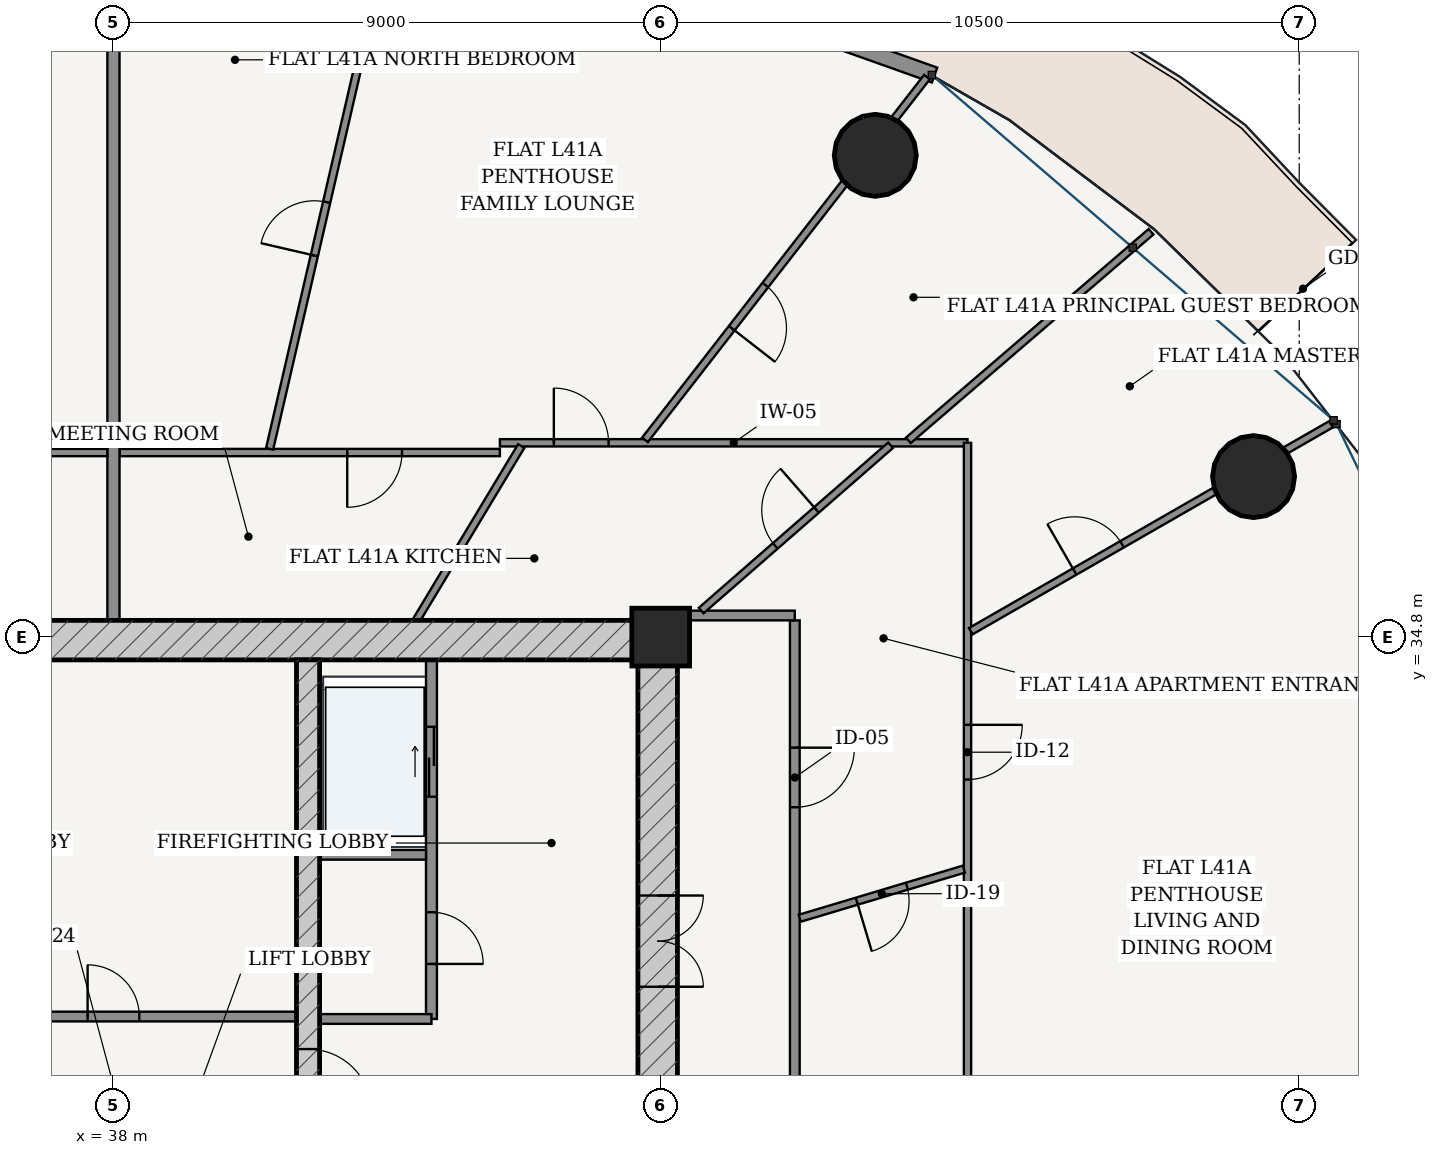
"""IFC4 building model, lengths in metres.
Left out: names, types, materials, properties, quantities, classifications, styles, units other than length and angle.
Written with IfcOpenShell. Run it as: python <this file> out.ifc"""

import sys

from ifc_helpers import new_model, si_unit, direction, frame, frame_2d, origin, origin_2d, place, context, subcontext, project, spatial, rectangle, hollow_circle, extrude, source, transform, mapped, element, fill, save


model = new_model("IFC4")
c1 = context("Model", 3, precision=1e-05, world=origin(), true_north=direction((-0.2419218956, 0.970295726276)))
c2 = subcontext(c1, "Body", "Model", "MODEL_VIEW")
j1 = project(units=[si_unit("LENGTHUNIT", "METRE"), si_unit("PLANEANGLEUNIT", "RADIAN")], contexts=[c1])
p1 = place(None, origin())
s1 = spatial("IfcSite", under=j1, at=p1, CompositionType="ELEMENT")
p2 = place(p1, origin())
s2 = spatial("IfcBuilding", under=s1, at=p2, CompositionType="ELEMENT")
p3 = place(p2, frame((0.0, 0.0, 157.0)))
s3 = spatial("IfcBuildingStorey", under=s2, at=p3, CompositionType="ELEMENT", Elevation=157.0)
p4 = place(p3, frame((47.0, 34.8, 0.0), z_axis=(0.0, 0.0, 1.0), x_axis=(1.0, 0.0, 0.0)))
e1 = element("IfcColumn", 1, at=p4, inside=s3, PredefinedType="COLUMN", context=c2, shape_type="SweptSolid", body=[
    extrude(rectangle(XDim=0.95, YDim=0.95, at=origin_2d()), origin(), (0.0, 0.0, 1.0), 3.6),
])
p5 = place(p3, frame((28.725, 34.75, 0.0), z_axis=(0.0, 0.0, 1.0), x_axis=(1.0, 0.0, 0.0)))
e2 = element("IfcWall", 2, at=p5, inside=s3, PredefinedType="SHEAR", context=c2, shape_type="SweptSolid", body=[
    extrude(rectangle(XDim=18.55, YDim=0.65, at=frame_2d((9.275, 0.0))), origin(), (0.0, 0.0, 1.0), 3.33),
])
p6 = place(p3, frame((46.95, 19.175, 0.0), z_axis=(0.0, 0.0, 1.0), x_axis=(0.0, 1.0, 0.0)))
e3 = element("IfcWall", 3, at=p6, inside=s3, PredefinedType="SHEAR", context=c2, shape_type="SweptSolid", body=[
    extrude(rectangle(XDim=15.25, YDim=0.65, at=frame_2d((7.625, 0.0))), origin(), (0.0, 0.0, 1.0), 3.33),
])
p7 = place(p6, frame((9.875, 0.0, 0.0)))
e4 = element("IfcOpeningElement", 4, at=p7, cuts=e3, PredefinedType="OPENING", context=c2, shape_type="SweptSolid", body=[
    extrude(rectangle(XDim=1.5, YDim=2.2, at=frame_2d((0.75, 1.1))), frame((0.0, 0.335, 0.0), z_axis=(0.0, -1.0, 0.0), x_axis=(1.0, 0.0, 0.0)), (0.0, 0.0, 1.0), 0.67),
])
p8 = place(p3, frame((41.2, 19.175, 0.0), z_axis=(0.0, 0.0, 1.0), x_axis=(0.0, 1.0, 0.0)))
e5 = element("IfcWall", 5, at=p8, inside=s3, PredefinedType="SHEAR", context=c2, shape_type="SweptSolid", body=[
    extrude(rectangle(XDim=15.25, YDim=0.38, at=frame_2d((7.625, 0.0))), origin(), (0.0, 0.0, 1.0), 3.33),
])
p9 = place(p8, frame((7.8, 0.0, 0.0)))
e6 = element("IfcOpeningElement", 6, at=p9, cuts=e5, PredefinedType="OPENING", context=c2, shape_type="SweptSolid", body=[
    extrude(rectangle(XDim=1.05, YDim=2.15, at=frame_2d((0.525, 1.075))), frame((0.0, 0.2, 0.0), z_axis=(0.0, -1.0, 0.0), x_axis=(1.0, 0.0, 0.0)), (0.0, 0.0, 1.0), 0.4),
])
for number, where, z_axis, x_axis in (
    (7, (56.75, 37.439, 0.0), (0.0, 0.0, 1.0), (1.0, 0.0, 0.0)),
    (8, (50.528, 42.723, 0.0), (0.0, 0.0, 1.0), (1.0, 0.0, 0.0)),
):
    element("IfcColumn", number, at=place(p3, frame(where, z_axis=z_axis, x_axis=x_axis)), inside=s3, PredefinedType="COLUMN", context=c2, shape_type="SweptSolid", body=[
        extrude(hollow_circle(Radius=0.675, WallThickness=0.042, at=origin_2d()), origin(), (0.0, 0.0, 1.0), 3.6),
    ])
p10 = place(p3, frame((51.503, 44.043, 0.0), z_axis=(0.0, 0.0, 1.0), x_axis=(-0.942095406405, 0.335344964522, 0.0)))
e9 = element("IfcWall", 9, at=p10, inside=s3, PredefinedType="SOLIDWALL", context=c2, shape_type="SweptSolid", body=[
    extrude(rectangle(XDim=9.408, YDim=0.26, at=frame_2d((4.704, 0.0))), origin(), (0.0, 0.0, 1.0), 3.33),
])
p11 = place(p10, frame((4.029, 0.0, 0.0)))
e10 = element("IfcOpeningElement", 10, at=p11, cuts=e9, PredefinedType="OPENING", context=c2, shape_type="SweptSolid", body=[
    extrude(rectangle(XDim=1.35, YDim=2.2, at=frame_2d((0.675, 1.1))), frame((0.0, 0.14, 0.0), z_axis=(0.0, -1.0, 0.0), x_axis=(1.0, 0.0, 0.0)), (0.0, 0.0, 1.0), 0.28),
])
p12 = place(p3, frame((43.23, 28.52, 0.0), z_axis=(0.0, 0.0, 1.0), x_axis=(0.0, 1.0, 0.0)))
e11 = element("IfcWall", 11, at=p12, inside=s3, PredefinedType="PARTITIONING", context=c2, shape_type="SweptSolid", body=[
    extrude(rectangle(XDim=5.905, YDim=0.18, at=frame_2d((2.953, 0.0))), origin(), (0.0, 0.0, 1.0), 3.33),
])
p13 = place(p12, frame((0.905, 0.0, 0.0)))
e12 = element("IfcOpeningElement", 12, at=p13, cuts=e11, PredefinedType="OPENING", context=c2, shape_type="SweptSolid", body=[
    extrude(rectangle(XDim=0.85, YDim=2.1, at=frame_2d((0.425, 1.05))), frame((0.0, 0.1, 0.0), z_axis=(0.0, -1.0, 0.0), x_axis=(1.0, 0.0, 0.0)), (0.0, 0.0, 1.0), 0.2),
])
p14 = place(p12, frame((3.655, 0.0, 0.0)))
e13 = element("IfcOpeningElement", 13, at=p14, cuts=e11, PredefinedType="OPENING", context=c2, shape_type="SweptSolid", body=[
    extrude(rectangle(XDim=1.15, YDim=2.2, at=frame_2d((0.575, 1.1))), frame((0.0, 0.1, 0.0), z_axis=(0.0, -1.0, 0.0), x_axis=(1.0, 0.0, 0.0)), (0.0, 0.0, 1.0), 0.2),
])
p15 = place(p3, frame((41.39, 31.22, 0.0), z_axis=(0.0, 0.0, 1.0), x_axis=(1.0, 0.0, 0.0)))
e14 = element("IfcWall", 14, at=p15, inside=s3, PredefinedType="PARTITIONING", context=c2, shape_type="SweptSolid", body=[
    extrude(rectangle(XDim=1.75, YDim=0.16, at=frame_2d((0.875, 0.0))), origin(), (0.0, 0.0, 1.0), 3.33),
])
p16 = place(p3, frame((41.39, 28.52, 0.0), z_axis=(0.0, 0.0, 1.0), x_axis=(1.0, 0.0, 0.0)))
e15 = element("IfcWall", 15, at=p16, inside=s3, PredefinedType="PARTITIONING", context=c2, shape_type="SweptSolid", body=[
    extrude(rectangle(XDim=1.84, YDim=0.16, at=frame_2d((0.92, 0.0))), origin(), (0.0, 0.0, 1.0), 3.33),
])
p17 = place(p3, frame((34.99, 28.56, 0.0), z_axis=(0.0, 0.0, 1.0), x_axis=(1.0, 0.0, 0.0)))
e16 = element("IfcWall", 16, at=p17, inside=s3, PredefinedType="PARTITIONING", context=c2, shape_type="SweptSolid", body=[
    extrude(rectangle(XDim=6.02, YDim=0.16, at=frame_2d((3.01, 0.0))), origin(), (0.0, 0.0, 1.0), 3.33),
])
p18 = place(p17, frame((2.585, 0.0, 0.0)))
e17 = element("IfcOpeningElement", 17, at=p18, cuts=e16, PredefinedType="OPENING", context=c2, shape_type="SweptSolid", body=[
    extrude(rectangle(XDim=0.85, YDim=2.1, at=frame_2d((0.425, 1.05))), frame((0.0, 0.09, 0.0), z_axis=(0.0, -1.0, 0.0), x_axis=(1.0, 0.0, 0.0)), (0.0, 0.0, 1.0), 0.18),
])
p19 = place(p3, frame((49.205, 16.675, 0.0), z_axis=(0.0, 0.0, 1.0), x_axis=(0.0, 1.0, 0.0)))
e18 = element("IfcWall", 18, at=p19, inside=s3, PredefinedType="PARTITIONING", context=c2, shape_type="SweptSolid", body=[
    extrude(rectangle(XDim=18.4, YDim=0.16, at=frame_2d((9.2, 0.0))), origin(), (0.0, 0.0, 1.0), 2.776),
])
p20 = place(p19, frame((15.326, 0.0, 0.0)))
e19 = element("IfcOpeningElement", 19, at=p20, cuts=e18, PredefinedType="OPENING", context=c2, shape_type="SweptSolid", body=[
    extrude(rectangle(XDim=0.98, YDim=2.2, at=frame_2d((0.49, 1.1))), frame((0.0, 0.09, 0.0), z_axis=(0.0, -1.0, 0.0), x_axis=(1.0, 0.0, 0.0)), (0.0, 0.0, 1.0), 0.18),
])
p21 = place(p3, frame((47.275, 35.155, 0.0), z_axis=(0.0, 0.0, 1.0), x_axis=(1.0, 0.0, 0.0)))
e20 = element("IfcWall", 20, at=p21, inside=s3, PredefinedType="PARTITIONING", context=c2, shape_type="SweptSolid", body=[
    extrude(rectangle(XDim=1.93, YDim=0.16, at=frame_2d((0.965, 0.0))), origin(), (0.0, 0.0, 1.0), 2.776),
])
p22 = place(p3, frame((38.102, 37.835, 0.0), z_axis=(0.0, 0.0, 1.0), x_axis=(1.0, 0.0, 0.0)))
e21 = element("IfcWall", 21, at=p22, inside=s3, PredefinedType="PARTITIONING", context=c2, shape_type="SweptSolid", body=[
    extrude(rectangle(XDim=6.253, YDim=0.12, at=frame_2d((3.126, 0.0))), origin(), (0.0, 0.0, 1.0), 2.776),
])
p23 = place(p22, frame((3.742, 0.0, 0.0)))
e22 = element("IfcOpeningElement", 22, at=p23, cuts=e21, PredefinedType="OPENING", context=c2, shape_type="SweptSolid", body=[
    extrude(rectangle(XDim=0.9, YDim=2.15, at=frame_2d((0.45, 1.075))), frame((0.0, 0.07, 0.0), z_axis=(0.0, -1.0, 0.0), x_axis=(1.0, 0.0, 0.0)), (0.0, 0.0, 1.0), 0.14),
])
p24 = place(p3, frame((44.355, 37.995, 0.0), z_axis=(0.0, 0.0, 1.0), x_axis=(1.0, 0.0, 0.0)))
e23 = element("IfcWall", 23, at=p24, inside=s3, PredefinedType="PARTITIONING", context=c2, shape_type="SweptSolid", body=[
    extrude(rectangle(XDim=7.69, YDim=0.12, at=frame_2d((3.845, 0.0))), origin(), (0.0, 0.0, 1.0), 2.776),
])
p25 = place(p24, frame((0.887, 0.0, 0.0)))
e24 = element("IfcOpeningElement", 24, at=p25, cuts=e23, PredefinedType="OPENING", context=c2, shape_type="SweptSolid", body=[
    extrude(rectangle(XDim=0.9, YDim=2.15, at=frame_2d((0.45, 1.075))), frame((0.0, 0.07, 0.0), z_axis=(0.0, -1.0, 0.0), x_axis=(1.0, 0.0, 0.0)), (0.0, 0.0, 1.0), 0.14),
])
p26 = place(p3, frame((52.045, 37.995, 0.0), z_axis=(0.0, 0.0, 1.0), x_axis=(0.0, -1.0, 0.0)))
e25 = element("IfcWall", 25, at=p26, inside=s3, PredefinedType="PARTITIONING", context=c2, shape_type="SweptSolid", body=[
    extrude(rectangle(XDim=11.093, YDim=0.12, at=frame_2d((5.546, 0.0))), origin(), (0.0, 0.0, 1.0), 2.776),
])
p27 = place(p26, frame((4.638, 0.0, 0.0)))
e26 = element("IfcOpeningElement", 26, at=p27, cuts=e25, PredefinedType="OPENING", context=c2, shape_type="SweptSolid", body=[
    extrude(rectangle(XDim=0.9, YDim=2.15, at=frame_2d((0.45, 1.075))), frame((0.0, 0.07, 0.0), z_axis=(0.0, -1.0, 0.0), x_axis=(1.0, 0.0, 0.0)), (0.0, 0.0, 1.0), 0.14),
])
p28 = place(p3, frame((52.099, 34.897, 0.0), z_axis=(0.0, 0.0, 1.0), x_axis=(0.867170536447, 0.498011305813, 0.0)))
e27 = element("IfcWall", 27, at=p28, inside=s3, PredefinedType="PARTITIONING", context=c2, shape_type="SweptSolid", body=[
    extrude(rectangle(XDim=6.834, YDim=0.12, at=frame_2d((3.417, 0.0))), origin(), (0.0, 0.0, 1.0), 2.776),
])
p29 = place(p28, frame((1.969, 0.0, 0.0)))
e28 = element("IfcOpeningElement", 28, at=p29, cuts=e27, PredefinedType="OPENING", context=c2, shape_type="SweptSolid", body=[
    extrude(rectangle(XDim=0.9, YDim=2.15, at=frame_2d((0.45, 1.075))), frame((0.0, 0.07, 0.0), z_axis=(0.0, -1.0, 0.0), x_axis=(1.0, 0.0, 0.0)), (0.0, 0.0, 1.0), 0.14),
])
p30 = place(p3, frame((51.072, 38.035, 0.0), z_axis=(0.0, 0.0, 1.0), x_axis=(0.758368609512, 0.65182593697, 0.0)))
e29 = element("IfcWall", 29, at=p30, inside=s3, PredefinedType="PARTITIONING", context=c2, shape_type="SweptSolid", body=[
    extrude(rectangle(XDim=5.263, YDim=0.12, at=frame_2d((2.632, 0.0))), origin(), (0.0, 0.0, 1.0), 2.846),
])
p31 = place(p3, frame((46.741, 38.044, 0.0), z_axis=(0.0, 0.0, 1.0), x_axis=(0.613770587295, 0.789484430607, 0.0)))
e30 = element("IfcWall", 30, at=p31, inside=s3, PredefinedType="PARTITIONING", context=c2, shape_type="SweptSolid", body=[
    extrude(rectangle(XDim=7.556, YDim=0.12, at=frame_2d((3.778, 0.0))), origin(), (0.0, 0.0, 1.0), 2.776),
])
p32 = place(p31, frame((2.325, 0.0, 0.0)))
e31 = element("IfcOpeningElement", 31, at=p32, cuts=e30, PredefinedType="OPENING", context=c2, shape_type="SweptSolid", body=[
    extrude(rectangle(XDim=0.9, YDim=2.15, at=frame_2d((0.45, 1.075))), frame((0.0, 0.07, 0.0), z_axis=(0.0, -1.0, 0.0), x_axis=(1.0, 0.0, 0.0)), (0.0, 0.0, 1.0), 0.14),
])
p33 = place(p3, frame((40.568, 37.896, 0.0), z_axis=(0.0, 0.0, 1.0), x_axis=(0.225452174141, 0.974254236416, 0.0)))
e32 = element("IfcWall", 32, at=p33, inside=s3, PredefinedType="PARTITIONING", context=c2, shape_type="SweptSolid", body=[
    extrude(rectangle(XDim=9.446, YDim=0.12, at=frame_2d((4.723, 0.0))), origin(), (0.0, 0.0, 1.0), 2.776),
])
p34 = place(p33, frame((3.264, 0.0, 0.0)))
e33 = element("IfcOpeningElement", 33, at=p34, cuts=e32, PredefinedType="OPENING", context=c2, shape_type="SweptSolid", body=[
    extrude(rectangle(XDim=0.9, YDim=2.15, at=frame_2d((0.45, 1.075))), frame((0.0, 0.07, 0.0), z_axis=(0.0, -1.0, 0.0), x_axis=(1.0, 0.0, 0.0)), (0.0, 0.0, 1.0), 0.14),
])
p35 = place(p3, frame((49.287, 30.177, 0.0), z_axis=(0.0, 0.0, 1.0), x_axis=(0.958045462778, 0.28661627876, 0.0)))
e34 = element("IfcWall", 34, at=p35, inside=s3, PredefinedType="PARTITIONING", context=c2, shape_type="SweptSolid", body=[
    extrude(rectangle(XDim=2.817, YDim=0.12, at=frame_2d((1.408, 0.0))), origin(), (0.0, 0.0, 1.0), 3.33),
])
p36 = place(p35, frame((0.979, 0.0, 0.0)))
e35 = element("IfcOpeningElement", 35, at=p36, cuts=e34, PredefinedType="OPENING", context=c2, shape_type="SweptSolid", body=[
    extrude(rectangle(XDim=0.86, YDim=2.15, at=frame_2d((0.43, 1.075))), frame((0.0, 0.07, 0.0), z_axis=(0.0, -1.0, 0.0), x_axis=(1.0, 0.0, 0.0)), (0.0, 0.0, 1.0), 0.14),
])
p37 = place(p3, frame((47.665, 35.236, 0.0), z_axis=(0.0, 0.0, 1.0), x_axis=(0.753384754287, 0.657579966246, 0.0)))
e36 = element("IfcWall", 36, at=p37, inside=s3, PredefinedType="PARTITIONING", context=c2, shape_type="SweptSolid", body=[
    extrude(rectangle(XDim=4.133, YDim=0.12, at=frame_2d((2.067, 0.0))), origin(), (0.0, 0.0, 1.0), 3.005),
])
p38 = place(p37, frame((1.617, 0.0, 0.0)))
e37 = element("IfcOpeningElement", 37, at=p38, cuts=e36, PredefinedType="OPENING", context=c2, shape_type="SweptSolid", body=[
    extrude(rectangle(XDim=0.9, YDim=2.15, at=frame_2d((0.45, 1.075))), frame((0.0, 0.07, 0.0), z_axis=(0.0, -1.0, 0.0), x_axis=(1.0, 0.0, 0.0)), (0.0, 0.0, 1.0), 0.14),
])
p39 = place(p3, frame((42.98, 35.075, 0.0), z_axis=(0.0, 0.0, 1.0), x_axis=(0.515686235332, 0.856777512946, 0.0)))
e38 = element("IfcWall", 38, at=p39, inside=s3, PredefinedType="PARTITIONING", context=c2, shape_type="SweptSolid", body=[
    extrude(rectangle(XDim=3.346, YDim=0.12, at=frame_2d((1.673, 0.0))), origin(), (0.0, 0.0, 1.0), 3.33),
])
p40 = place(p3, frame((38.0, 35.075, 0.0), z_axis=(0.0, 0.0, 1.0), x_axis=(0.0, 1.0, 0.0)))
e39 = element("IfcWall", 39, at=p40, inside=s3, PredefinedType="PARTITIONING", context=c2, shape_type="SweptSolid", body=[
    extrude(rectangle(XDim=12.465, YDim=0.2, at=frame_2d((6.232, 0.0))), origin(), (0.0, 0.0, 1.0), 2.415),
])
p41 = place(p3, frame((31.645, 37.835, 0.0), z_axis=(0.0, 0.0, 1.0), x_axis=(1.0, 0.0, 0.0)))
e40 = element("IfcWall", 40, at=p41, inside=s3, PredefinedType="PARTITIONING", context=c2, shape_type="SweptSolid", body=[
    extrude(rectangle(XDim=6.253, YDim=0.12, at=frame_2d((3.126, 0.0))), origin(), (0.0, 0.0, 1.0), 2.776),
])
m1 = source(origin(), c2, "Body", "SweptSolid", [
    extrude(rectangle(XDim=1.5, YDim=2.2, at=frame_2d((0.75, 1.1))), frame((0.0, 0.025, 0.0), z_axis=(0.0, -1.0, 0.0), x_axis=(1.0, 0.0, 0.0)), (0.0, 0.0, 1.0), 0.05),
])
p42 = place(p7, frame((1.5, 0.0, 0.0), z_axis=(0.0, 0.0, 1.0), x_axis=(-1.0, 0.0, 0.0)))
e41 = element("IfcDoor", 41, at=p42, inside=s3, OperationType="DOUBLE_DOOR_SINGLE_SWING", PredefinedType="DOOR", context=c2, shape_type="MappedRepresentation", body=[
    mapped(m1, transform((0.0, 0.0, 0.0), scale=1.0)),
])
fill(e4, e41)
m2 = source(origin(), c2, "Body", "SweptSolid", [
    extrude(rectangle(XDim=1.05, YDim=2.15, at=frame_2d((0.525, 1.075))), frame((0.0, 0.025, 0.0), z_axis=(0.0, -1.0, 0.0), x_axis=(1.0, 0.0, 0.0)), (0.0, 0.0, 1.0), 0.05),
])
p43 = place(p9, frame((1.05, 0.0, 0.0), z_axis=(0.0, 0.0, 1.0), x_axis=(-1.0, 0.0, 0.0)))
e42 = element("IfcDoor", 42, at=p43, inside=s3, OperationType="SINGLE_SWING_RIGHT", PredefinedType="DOOR", context=c2, shape_type="MappedRepresentation", body=[
    mapped(m2, transform((0.0, 0.0, 0.0), scale=1.0)),
])
fill(e6, e42)
m3 = source(origin(), c2, "Body", "SweptSolid", [
    extrude(rectangle(XDim=0.85, YDim=2.1, at=frame_2d((0.425, 1.05))), frame((0.0, 0.025, 0.0), z_axis=(0.0, -1.0, 0.0), x_axis=(1.0, 0.0, 0.0)), (0.0, 0.0, 1.0), 0.05),
])
p44 = place(p13, frame((0.85, 0.0, 0.0), z_axis=(0.0, 0.0, 1.0), x_axis=(-1.0, 0.0, 0.0)))
e43 = element("IfcDoor", 43, at=p44, inside=s3, OperationType="SINGLE_SWING_RIGHT", PredefinedType="DOOR", context=c2, shape_type="MappedRepresentation", body=[
    mapped(m3, transform((0.0, 0.0, 0.0), scale=1.0)),
])
fill(e12, e43)
p45 = place(p18, origin())
e44 = element("IfcDoor", 44, at=p45, inside=s3, OperationType="SINGLE_SWING_LEFT", PredefinedType="DOOR", context=c2, shape_type="MappedRepresentation", body=[
    mapped(m3, transform((0.0, 0.0, 0.0), scale=1.0)),
])
fill(e17, e44)
m4 = source(origin(), c2, "Body", "SweptSolid", [
    extrude(rectangle(XDim=1.15, YDim=2.2, at=frame_2d((0.575, 1.1))), frame((0.0, 0.025, 0.0), z_axis=(0.0, -1.0, 0.0), x_axis=(1.0, 0.0, 0.0)), (0.0, 0.0, 1.0), 0.05),
])
p46 = place(p14, origin())
e45 = element("IfcDoor", 45, at=p46, inside=s3, OperationType="DOUBLE_DOOR_SLIDING", PredefinedType="DOOR", context=c2, shape_type="MappedRepresentation", body=[
    mapped(m4, transform((0.0, 0.0, 0.0), scale=1.0)),
])
fill(e13, e45)
m5 = source(origin(), c2, "Body", "SweptSolid", [
    extrude(rectangle(XDim=0.98, YDim=2.2, at=frame_2d((0.49, 1.1))), frame((0.0, 0.025, 0.0), z_axis=(0.0, -1.0, 0.0), x_axis=(1.0, 0.0, 0.0)), (0.0, 0.0, 1.0), 0.05),
])
p47 = place(p20, frame((0.98, 0.0, 0.0), z_axis=(0.0, 0.0, 1.0), x_axis=(-1.0, 0.0, 0.0)))
e46 = element("IfcDoor", 46, at=p47, inside=s3, OperationType="SINGLE_SWING_LEFT", PredefinedType="DOOR", context=c2, shape_type="MappedRepresentation", body=[
    mapped(m5, transform((0.0, 0.0, 0.0), scale=1.0)),
])
fill(e19, e46)
m6 = source(origin(), c2, "Body", "SweptSolid", [
    extrude(rectangle(XDim=0.86, YDim=2.15, at=frame_2d((0.43, 1.075))), frame((0.0, 0.025, 0.0), z_axis=(0.0, -1.0, 0.0), x_axis=(1.0, 0.0, 0.0)), (0.0, 0.0, 1.0), 0.05),
])
p48 = place(p36, frame((0.86, 0.0, 0.0), z_axis=(0.0, 0.0, 1.0), x_axis=(-1.0, 0.0, 0.0)))
e47 = element("IfcDoor", 47, at=p48, inside=s3, OperationType="SINGLE_SWING_RIGHT", PredefinedType="DOOR", context=c2, shape_type="MappedRepresentation", body=[
    mapped(m6, transform((0.0, 0.0, 0.0), scale=1.0)),
])
fill(e35, e47)
m7 = source(origin(), c2, "Body", "SweptSolid", [
    extrude(rectangle(XDim=0.9, YDim=2.15, at=frame_2d((0.45, 1.075))), frame((0.0, 0.025, 0.0), z_axis=(0.0, -1.0, 0.0), x_axis=(1.0, 0.0, 0.0)), (0.0, 0.0, 1.0), 0.05),
])
p49 = place(p27, origin())
e48 = element("IfcDoor", 48, at=p49, inside=s3, OperationType="SINGLE_SWING_LEFT", PredefinedType="DOOR", context=c2, shape_type="MappedRepresentation", body=[
    mapped(m7, transform((0.0, 0.0, 0.0), scale=1.0)),
])
fill(e26, e48)
p50 = place(p38, origin())
e49 = element("IfcDoor", 49, at=p50, inside=s3, OperationType="SINGLE_SWING_RIGHT", PredefinedType="DOOR", context=c2, shape_type="MappedRepresentation", body=[
    mapped(m7, transform((0.0, 0.0, 0.0), scale=1.0)),
])
fill(e37, e49)
p51 = place(p25, origin())
e50 = element("IfcDoor", 50, at=p51, inside=s3, OperationType="SINGLE_SWING_LEFT", PredefinedType="DOOR", context=c2, shape_type="MappedRepresentation", body=[
    mapped(m7, transform((0.0, 0.0, 0.0), scale=1.0)),
])
fill(e24, e50)
p52 = place(p23, frame((0.9, 0.0, 0.0), z_axis=(0.0, 0.0, 1.0), x_axis=(-1.0, 0.0, 0.0)))
e51 = element("IfcDoor", 51, at=p52, inside=s3, OperationType="SINGLE_SWING_RIGHT", PredefinedType="DOOR", context=c2, shape_type="MappedRepresentation", body=[
    mapped(m7, transform((0.0, 0.0, 0.0), scale=1.0)),
])
fill(e22, e51)
p53 = place(p29, origin())
e52 = element("IfcDoor", 52, at=p53, inside=s3, OperationType="SINGLE_SWING_LEFT", PredefinedType="DOOR", context=c2, shape_type="MappedRepresentation", body=[
    mapped(m7, transform((0.0, 0.0, 0.0), scale=1.0)),
])
fill(e28, e52)
p54 = place(p32, frame((0.9, 0.0, 0.0), z_axis=(0.0, 0.0, 1.0), x_axis=(-1.0, 0.0, 0.0)))
e53 = element("IfcDoor", 53, at=p54, inside=s3, OperationType="SINGLE_SWING_RIGHT", PredefinedType="DOOR", context=c2, shape_type="MappedRepresentation", body=[
    mapped(m7, transform((0.0, 0.0, 0.0), scale=1.0)),
])
fill(e31, e53)
p55 = place(p34, origin())
e54 = element("IfcDoor", 54, at=p55, inside=s3, OperationType="SINGLE_SWING_LEFT", PredefinedType="DOOR", context=c2, shape_type="MappedRepresentation", body=[
    mapped(m7, transform((0.0, 0.0, 0.0), scale=1.0)),
])
fill(e33, e54)
save(model, sys.argv[1])
